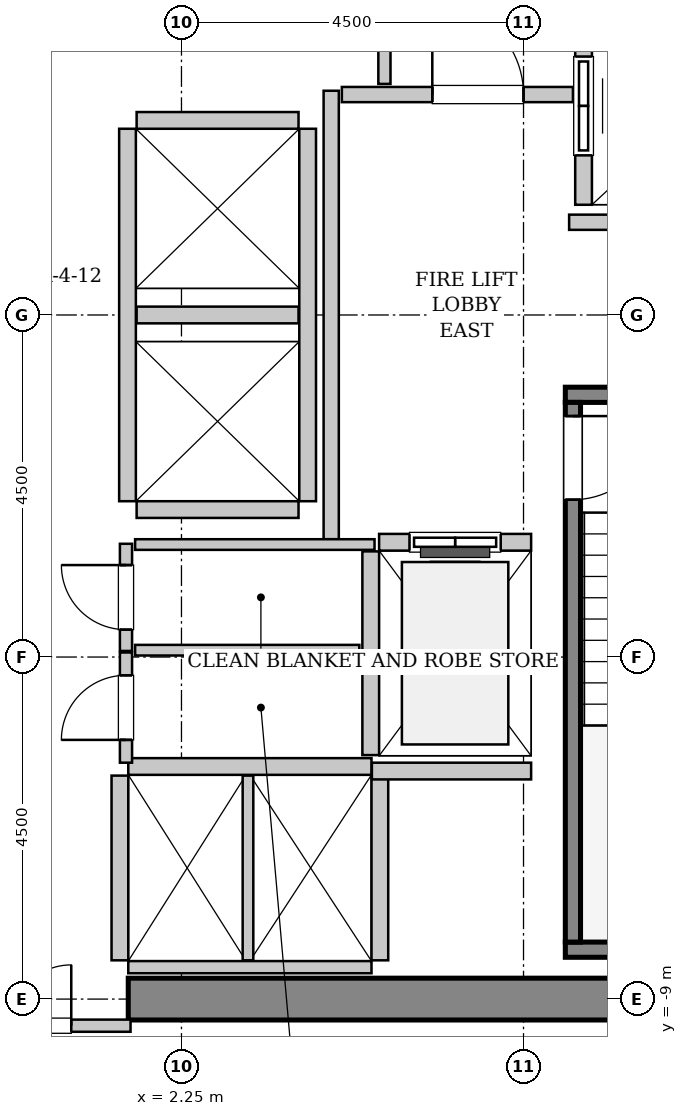
"""IFC4 building model, lengths in metres.
Left out: names, types, materials, properties, quantities, classifications, styles, units other than length and angle.
Written with IfcOpenShell. Run it as: python <this file> out.ifc"""

import sys

from ifc_helpers import new_model, si_unit, direction, frame, frame_2d, origin, place, context, subcontext, project, spatial, rectangle, extrude, source, transform, mapped, element, fill, save


model = new_model("IFC4")
c1 = context("Model", 3, precision=1e-05, world=origin(), true_north=direction((0.0, 1.0)))
c2 = subcontext(c1, "Body", "Model", "MODEL_VIEW")
j1 = project(units=[si_unit("LENGTHUNIT", "METRE"), si_unit("PLANEANGLEUNIT", "RADIAN")], contexts=[c1])
p1 = place(None, origin())
s1 = spatial("IfcSite", under=j1, at=p1, CompositionType="ELEMENT")
p2 = place(p1, origin())
s2 = spatial("IfcBuilding", under=s1, at=p2, CompositionType="ELEMENT")
p3 = place(p2, frame((0.0, 0.0, 109.8)))
s3 = spatial("IfcBuildingStorey", under=s2, at=p3, CompositionType="ELEMENT", Elevation=109.8)
m1 = source(origin(), c2, "Body", "SweptSolid", [
    extrude(rectangle(XDim=9.975, YDim=0.55, at=frame_2d((4.987, 0.0))), origin(), (0.0, 0.0, 1.0), 3.8),
])
p4 = place(p3, frame((1.55, -9.0, 0.0), z_axis=(0.0, 0.0, 1.0), x_axis=(1.0, 0.0, 0.0)))
e1 = element("IfcWall", 1, at=p4, inside=s3, PredefinedType="SHEAR", context=c2, shape_type="MappedRepresentation", body=[
    mapped(m1, transform((0.0, 0.0, 0.0), x_axis=(1.0, 0.0, 0.0), y_axis=(0.0, 1.0, 0.0), z_axis=(0.0, 0.0, 1.0), scale=1.0)),
])
m2 = source(origin(), c2, "Body", "SweptSolid", [
    extrude(rectangle(XDim=3.4, YDim=0.2, at=frame_2d((1.7, 0.0))), origin(), (0.0, 0.0, 1.0), 3.8),
])
p5 = place(p3, frame((7.3, -1.05, 0.0), z_axis=(0.0, 0.0, 1.0), x_axis=(1.0, 0.0, 0.0)))
e2 = element("IfcWall", 2, at=p5, inside=s3, PredefinedType="SOLIDWALL", context=c2, shape_type="MappedRepresentation", body=[
    mapped(m2, transform((0.0, 0.0, 0.0), x_axis=(1.0, 0.0, 0.0), y_axis=(0.0, 1.0, 0.0), z_axis=(0.0, 0.0, 1.0), scale=1.0)),
])
m3 = source(origin(), c2, "Body", "SweptSolid", [
    extrude(rectangle(XDim=3.68, YDim=0.2, at=frame_2d((1.84, 0.0))), origin(), (0.0, 0.0, 1.0), 3.8),
])
p6 = place(p3, frame((7.3, -8.35, 0.0), z_axis=(0.0, 0.0, 1.0), x_axis=(1.0, 0.0, 0.0)))
e3 = element("IfcWall", 3, at=p6, inside=s3, PredefinedType="SOLIDWALL", context=c2, shape_type="MappedRepresentation", body=[
    mapped(m3, transform((0.0, 0.0, 0.0), x_axis=(1.0, 0.0, 0.0), y_axis=(0.0, 1.0, 0.0), z_axis=(0.0, 0.0, 1.0), scale=1.0)),
])
m4 = source(origin(), c2, "Body", "SweptSolid", [
    extrude(rectangle(XDim=7.1, YDim=0.2, at=frame_2d((3.55, 0.0))), origin(), (0.0, 0.0, 1.0), 3.8),
])
p7 = place(p3, frame((7.4, -1.15, 0.0), z_axis=(0.0, 0.0, 1.0), x_axis=(0.0, -1.0, 0.0)))
e4 = element("IfcWall", 4, at=p7, inside=s3, PredefinedType="SOLIDWALL", context=c2, shape_type="MappedRepresentation", body=[
    mapped(m4, transform((0.0, 0.0, 0.0), x_axis=(1.0, 0.0, 0.0), y_axis=(0.0, 1.0, 0.0), z_axis=(0.0, 0.0, 1.0), scale=1.0)),
])
p8 = place(p7, frame((0.18, 0.0, 0.0)))
e5 = element("IfcOpeningElement", 5, at=p8, cuts=e4, PredefinedType="OPENING", context=c2, shape_type="SweptSolid", body=[
    extrude(rectangle(XDim=1.1, YDim=2.15, at=frame_2d((0.55, 1.075))), frame((0.0, 0.11, 0.0), z_axis=(0.0, -1.0, 0.0), x_axis=(1.0, 0.0, 0.0)), (0.0, 0.0, 1.0), 0.22),
])
m5 = source(origin(), c2, "Body", "SweptSolid", [
    extrude(rectangle(XDim=2.0, YDim=0.22, at=frame_2d((1.0, 0.0))), origin(), (0.0, 0.0, 1.0), 3.535),
])
p9 = place(p3, frame((6.85, -2.99, 0.0), z_axis=(0.0, 0.0, 1.0), x_axis=(-1.0, 0.0, 0.0)))
e6 = element("IfcWall", 6, at=p9, inside=s3, PredefinedType="SOLIDWALL", context=c2, shape_type="MappedRepresentation", body=[
    mapped(m5, transform((0.0, 0.0, 0.0), x_axis=(1.0, 0.0, 0.0), y_axis=(0.0, 1.0, 0.0), z_axis=(0.0, 0.0, 1.0), scale=1.0)),
])
p10 = place(p9, frame((0.4, 0.0, 0.0)))
e7 = element("IfcOpeningElement", 7, at=p10, cuts=e6, PredefinedType="OPENING", context=c2, shape_type="SweptSolid", body=[
    extrude(rectangle(XDim=1.2, YDim=2.2, at=frame_2d((0.6, 1.1))), frame((0.0, 0.12, 0.0), z_axis=(0.0, -1.0, 0.0), x_axis=(1.0, 0.0, 0.0)), (0.0, 0.0, 1.0), 0.24),
])
m6 = source(origin(), c2, "Body", "SweptSolid", [
    extrude(rectangle(XDim=2.68, YDim=0.22, at=frame_2d((1.34, 0.0))), origin(), (0.0, 0.0, 1.0), 3.535),
])
p11 = place(p3, frame((4.74, -3.11, 0.0), z_axis=(0.0, 0.0, 1.0), x_axis=(0.0, -1.0, 0.0)))
e8 = element("IfcWall", 8, at=p11, inside=s3, PredefinedType="SOLIDWALL", context=c2, shape_type="MappedRepresentation", body=[
    mapped(m6, transform((0.0, 0.0, 0.0), x_axis=(1.0, 0.0, 0.0), y_axis=(0.0, 1.0, 0.0), z_axis=(0.0, 0.0, 1.0), scale=1.0)),
])
m7 = source(origin(), c2, "Body", "SweptSolid", [
    extrude(rectangle(XDim=5.45, YDim=0.22, at=frame_2d((2.725, 0.0))), origin(), (0.0, 0.0, 1.0), 3.535),
])
p12 = place(p3, frame((7.54, 6.9, 0.0), z_axis=(0.0, 0.0, 1.0), x_axis=(0.0, -1.0, 0.0)))
e9 = element("IfcWall", 9, at=p12, inside=s3, PredefinedType="SOLIDWALL", context=c2, shape_type="MappedRepresentation", body=[
    mapped(m7, transform((0.0, 0.0, 0.0), x_axis=(1.0, 0.0, 0.0), y_axis=(0.0, 1.0, 0.0), z_axis=(0.0, 0.0, 1.0), scale=1.0)),
])
p13 = place(p12, frame((3.5, 0.0, 0.0)))
e10 = element("IfcOpeningElement", 10, at=p13, cuts=e9, PredefinedType="OPENING", context=c2, shape_type="SweptSolid", body=[
    extrude(rectangle(XDim=1.3, YDim=2.3, at=frame_2d((0.65, 1.15))), frame((0.0, 0.12, 0.0), z_axis=(0.0, -1.0, 0.0), x_axis=(1.0, 0.0, 0.0)), (0.0, 0.0, 1.0), 0.24),
])
p14 = place(p12, frame((0.65, 0.0, 0.0)))
e11 = element("IfcOpeningElement", 11, at=p14, cuts=e9, PredefinedType="OPENING", context=c2, shape_type="SweptSolid", body=[
    extrude(rectangle(XDim=1.3, YDim=2.3, at=frame_2d((0.65, 1.15))), frame((0.0, 0.12, 0.0), z_axis=(0.0, -1.0, 0.0), x_axis=(1.0, 0.0, 0.0)), (0.0, 0.0, 1.0), 0.24),
])
m8 = source(origin(), c2, "Body", "SweptSolid", [
    extrude(rectangle(XDim=3.2, YDim=0.22, at=frame_2d((1.6, 0.0))), origin(), (0.0, 0.0, 1.0), 3.535),
])
p15 = place(p3, frame((4.75, -5.94, 0.0), z_axis=(0.0, 0.0, 1.0), x_axis=(-1.0, 0.0, 0.0)))
e12 = element("IfcWall", 12, at=p15, inside=s3, PredefinedType="SOLIDWALL", context=c2, shape_type="MappedRepresentation", body=[
    mapped(m8, transform((0.0, 0.0, 0.0), x_axis=(1.0, 0.0, 0.0), y_axis=(0.0, 1.0, 0.0), z_axis=(0.0, 0.0, 1.0), scale=1.0)),
])
m9 = source(origin(), c2, "Body", "SweptSolid", [
    extrude(rectangle(XDim=3.2, YDim=0.16, at=frame_2d((1.6, 0.0))), origin(), (0.0, 0.0, 1.0), 2.425),
])
p16 = place(p3, frame((1.55, -8.58, 0.0), z_axis=(0.0, 0.0, 1.0), x_axis=(1.0, 0.0, 0.0)))
e13 = element("IfcWall", 13, at=p16, inside=s3, PredefinedType="PARTITIONING", context=c2, shape_type="MappedRepresentation", body=[
    mapped(m9, transform((0.0, 0.0, 0.0), x_axis=(1.0, 0.0, 0.0), y_axis=(0.0, 1.0, 0.0), z_axis=(0.0, 0.0, 1.0), scale=1.0)),
])
m10 = source(origin(), c2, "Body", "SweptSolid", [
    extrude(rectangle(XDim=2.43, YDim=0.22, at=frame_2d((1.215, 0.0))), origin(), (0.0, 0.0, 1.0), 3.535),
])
p17 = place(p3, frame((1.44, -6.06, 0.0), z_axis=(0.0, 0.0, 1.0), x_axis=(0.0, -1.0, 0.0)))
e14 = element("IfcWall", 14, at=p17, inside=s3, PredefinedType="SOLIDWALL", context=c2, shape_type="MappedRepresentation", body=[
    mapped(m10, transform((0.0, 0.0, 0.0), x_axis=(1.0, 0.0, 0.0), y_axis=(0.0, 1.0, 0.0), z_axis=(0.0, 0.0, 1.0), scale=1.0)),
])
m11 = source(origin(), c2, "Body", "SweptSolid", [
    extrude(rectangle(XDim=2.43, YDim=0.14, at=frame_2d((1.215, 0.0))), origin(), (0.0, 0.0, 1.0), 3.535),
])
p18 = place(p3, frame((3.125, -8.49, 0.0), z_axis=(0.0, 0.0, 1.0), x_axis=(0.0, 1.0, 0.0)))
e15 = element("IfcWall", 15, at=p18, inside=s3, PredefinedType="PARTITIONING", context=c2, shape_type="MappedRepresentation", body=[
    mapped(m11, transform((0.0, 0.0, 0.0), x_axis=(1.0, 0.0, 0.0), y_axis=(0.0, 1.0, 0.0), z_axis=(0.0, 0.0, 1.0), scale=1.0)),
])
p19 = place(p3, frame((4.86, -8.49, 0.0), z_axis=(0.0, 0.0, 1.0), x_axis=(0.0, 1.0, 0.0)))
e16 = element("IfcWall", 16, at=p19, inside=s3, PredefinedType="SOLIDWALL", context=c2, shape_type="MappedRepresentation", body=[
    mapped(m10, transform((0.0, 0.0, 0.0), x_axis=(1.0, 0.0, 0.0), y_axis=(0.0, 1.0, 0.0), z_axis=(0.0, 0.0, 1.0), scale=1.0)),
])
m12 = source(origin(), c2, "Body", "SweptSolid", [
    extrude(rectangle(XDim=4.9, YDim=0.22, at=frame_2d((2.45, 0.0))), origin(), (0.0, 0.0, 1.0), 3.535),
])
for number, where, z_axis, x_axis in (
    (17, (1.54, 2.45, 0.0), (0.0, 0.0, 1.0), (0.0, -1.0, 0.0)),
    (18, (3.91, -2.45, 0.0), (0.0, 0.0, 1.0), (0.0, 1.0, 0.0)),
):
    element("IfcWall", number, at=place(p3, frame(where, z_axis=z_axis, x_axis=x_axis)), inside=s3, PredefinedType="SOLIDWALL", context=c2, shape_type="MappedRepresentation", body=[
        mapped(m12, transform((0.0, 0.0, 0.0), x_axis=(1.0, 0.0, 0.0), y_axis=(0.0, 1.0, 0.0), z_axis=(0.0, 0.0, 1.0), scale=1.0)),
    ])
m13 = source(origin(), c2, "Body", "SweptSolid", [
    extrude(rectangle(XDim=2.13, YDim=0.22, at=frame_2d((1.065, 0.0))), origin(), (0.0, 0.0, 1.0), 3.535),
])
for number, where, z_axis, x_axis in (
    (19, (1.66, -2.56, 0.0), (0.0, 0.0, 1.0), (1.0, 0.0, 0.0)),
    (20, (1.66, 0.0, 0.0), (0.0, 0.0, 1.0), (1.0, 0.0, 0.0)),
    (21, (3.79, 2.56, 0.0), (0.0, 0.0, 1.0), (-1.0, 0.0, 0.0)),
):
    element("IfcWall", number, at=place(p3, frame(where, z_axis=z_axis, x_axis=x_axis)), inside=s3, PredefinedType="SOLIDWALL", context=c2, shape_type="MappedRepresentation", body=[
        mapped(m13, transform((0.0, 0.0, 0.0), x_axis=(1.0, 0.0, 0.0), y_axis=(0.0, 1.0, 0.0), z_axis=(0.0, 0.0, 1.0), scale=1.0)),
    ])
m14 = source(origin(), c2, "Body", "SweptSolid", [
    extrude(rectangle(XDim=2.095, YDim=0.22, at=frame_2d((1.048, 0.0))), origin(), (0.0, 0.0, 1.0), 3.535),
])
p20 = place(p3, frame((4.755, -6.0, 0.0), z_axis=(0.0, 0.0, 1.0), x_axis=(1.0, 0.0, 0.0)))
e22 = element("IfcWall", 22, at=p20, inside=s3, PredefinedType="SOLIDWALL", context=c2, shape_type="MappedRepresentation", body=[
    mapped(m14, transform((0.0, 0.0, 0.0), x_axis=(1.0, 0.0, 0.0), y_axis=(0.0, 1.0, 0.0), z_axis=(0.0, 0.0, 1.0), scale=1.0)),
])
m15 = source(origin(), c2, "Body", "SweptSolid", [
    extrude(rectangle(XDim=5.9, YDim=0.2, at=frame_2d((2.95, 0.0))), origin(), (0.0, 0.0, 1.0), 3.535),
])
p21 = place(p3, frame((4.22, -2.95, 0.0), z_axis=(0.0, 0.0, 1.0), x_axis=(0.0, 1.0, 0.0)))
e23 = element("IfcWall", 23, at=p21, inside=s3, PredefinedType="PARTITIONING", context=c2, shape_type="MappedRepresentation", body=[
    mapped(m15, transform((0.0, 0.0, 0.0), x_axis=(1.0, 0.0, 0.0), y_axis=(0.0, 1.0, 0.0), z_axis=(0.0, 0.0, 1.0), scale=1.0)),
])
m16 = source(origin(), c2, "Body", "SweptSolid", [
    extrude(rectangle(XDim=3.04, YDim=0.2, at=frame_2d((1.52, 0.0))), origin(), (0.0, 0.0, 1.0), 3.535),
])
p22 = place(p3, frame((4.36, 2.9, 0.0), z_axis=(0.0, 0.0, 1.0), x_axis=(1.0, 0.0, 0.0)))
e24 = element("IfcWall", 24, at=p22, inside=s3, PredefinedType="PARTITIONING", context=c2, shape_type="MappedRepresentation", body=[
    mapped(m16, transform((0.0, 0.0, 0.0), x_axis=(1.0, 0.0, 0.0), y_axis=(0.0, 1.0, 0.0), z_axis=(0.0, 0.0, 1.0), scale=1.0)),
])
p23 = place(p22, frame((1.19, 0.0, 0.0)))
e25 = element("IfcOpeningElement", 25, at=p23, cuts=e24, PredefinedType="OPENING", context=c2, shape_type="SweptSolid", body=[
    extrude(rectangle(XDim=1.2, YDim=2.15, at=frame_2d((0.6, 1.075))), frame((0.0, 0.11, 0.0), z_axis=(0.0, -1.0, 0.0), x_axis=(1.0, 0.0, 0.0)), (0.0, 0.0, 1.0), 0.22),
])
m17 = source(origin(), c2, "Body", "SweptSolid", [
    extrude(rectangle(XDim=4.11, YDim=0.2, at=frame_2d((2.055, 0.0))), origin(), (0.0, 0.0, 1.0), 3.535),
])
p24 = place(p3, frame((7.35, 1.22, 0.0), z_axis=(0.0, 0.0, 1.0), x_axis=(1.0, 0.0, 0.0)))
e26 = element("IfcWall", 26, at=p24, inside=s3, PredefinedType="PARTITIONING", context=c2, shape_type="MappedRepresentation", body=[
    mapped(m17, transform((0.0, 0.0, 0.0), x_axis=(1.0, 0.0, 0.0), y_axis=(0.0, 1.0, 0.0), z_axis=(0.0, 0.0, 1.0), scale=1.0)),
])
m18 = source(origin(), c2, "Body", "SweptSolid", [
    extrude(rectangle(XDim=3.16, YDim=0.16, at=frame_2d((1.58, 0.0))), origin(), (0.0, 0.0, 1.0), 2.425),
])
p25 = place(p3, frame((-1.58, -9.35, 0.0), z_axis=(0.0, 0.0, 1.0), x_axis=(1.0, 0.0, 0.0)))
e27 = element("IfcWall", 27, at=p25, inside=s3, PredefinedType="PARTITIONING", context=c2, shape_type="MappedRepresentation", body=[
    mapped(m18, transform((0.0, 0.0, 0.0), x_axis=(1.0, 0.0, 0.0), y_axis=(0.0, 1.0, 0.0), z_axis=(0.0, 0.0, 1.0), scale=1.0)),
])
p26 = place(p25, frame((0.78, 0.0, 0.0)))
e28 = element("IfcOpeningElement", 28, at=p26, cuts=e27, PredefinedType="OPENING", context=c2, shape_type="SweptSolid", body=[
    extrude(rectangle(XDim=1.6, YDim=2.3, at=frame_2d((0.8, 1.15))), frame((0.0, 0.09, 0.0), z_axis=(0.0, -1.0, 0.0), x_axis=(1.0, 0.0, 0.0)), (0.0, 0.0, 1.0), 0.18),
])
m19 = source(origin(), c2, "Body", "SweptSolid", [
    extrude(rectangle(XDim=3.015, YDim=0.16, at=frame_2d((1.507, 0.0))), origin(), (0.0, 0.0, 1.0), 3.535),
])
p27 = place(p3, frame((4.92, 3.04, 0.0), z_axis=(0.0, 0.0, 1.0), x_axis=(0.0, 1.0, 0.0)))
e29 = element("IfcWall", 29, at=p27, inside=s3, PredefinedType="PARTITIONING", context=c2, shape_type="MappedRepresentation", body=[
    mapped(m19, transform((0.0, 0.0, 0.0), x_axis=(1.0, 0.0, 0.0), y_axis=(0.0, 1.0, 0.0), z_axis=(0.0, 0.0, 1.0), scale=1.0)),
])
m20 = source(origin(), c2, "Body", "SweptSolid", [
    extrude(rectangle(XDim=1.41, YDim=0.16, at=frame_2d((0.705, 0.0))), origin(), (0.0, 0.0, 1.0), 3.535),
])
p28 = place(p3, frame((1.52, -4.42, 0.0), z_axis=(0.0, 0.0, 1.0), x_axis=(0.0, 1.0, 0.0)))
e30 = element("IfcWall", 30, at=p28, inside=s3, PredefinedType="PARTITIONING", context=c2, shape_type="MappedRepresentation", body=[
    mapped(m20, transform((0.0, 0.0, 0.0), x_axis=(1.0, 0.0, 0.0), y_axis=(0.0, 1.0, 0.0), z_axis=(0.0, 0.0, 1.0), scale=1.0)),
])
p29 = place(p28, frame((0.28, 0.0, 0.0)))
e31 = element("IfcOpeningElement", 31, at=p29, cuts=e30, PredefinedType="OPENING", context=c2, shape_type="SweptSolid", body=[
    extrude(rectangle(XDim=0.85, YDim=2.1, at=frame_2d((0.425, 1.05))), frame((0.0, 0.09, 0.0), z_axis=(0.0, -1.0, 0.0), x_axis=(1.0, 0.0, 0.0)), (0.0, 0.0, 1.0), 0.18),
])
m21 = source(origin(), c2, "Body", "SweptSolid", [
    extrude(rectangle(XDim=3.15, YDim=0.14, at=frame_2d((1.575, 0.0))), origin(), (0.0, 0.0, 1.0), 3.535),
])
p30 = place(p3, frame((1.64, -3.02, 0.0), z_axis=(0.0, 0.0, 1.0), x_axis=(1.0, 0.0, 0.0)))
e32 = element("IfcWall", 32, at=p30, inside=s3, PredefinedType="PARTITIONING", context=c2, shape_type="MappedRepresentation", body=[
    mapped(m21, transform((0.0, 0.0, 0.0), x_axis=(1.0, 0.0, 0.0), y_axis=(0.0, 1.0, 0.0), z_axis=(0.0, 0.0, 1.0), scale=1.0)),
])
m22 = source(origin(), c2, "Body", "SweptSolid", [
    extrude(rectangle(XDim=2.95, YDim=0.14, at=frame_2d((1.475, 0.0))), origin(), (0.0, 0.0, 1.0), 3.535),
])
p31 = place(p3, frame((1.64, -4.41, 0.0), z_axis=(0.0, 0.0, 1.0), x_axis=(1.0, 0.0, 0.0)))
e33 = element("IfcWall", 33, at=p31, inside=s3, PredefinedType="PARTITIONING", context=c2, shape_type="MappedRepresentation", body=[
    mapped(m22, transform((0.0, 0.0, 0.0), x_axis=(1.0, 0.0, 0.0), y_axis=(0.0, 1.0, 0.0), z_axis=(0.0, 0.0, 1.0), scale=1.0)),
])
m23 = source(origin(), c2, "Body", "SweptSolid", [
    extrude(rectangle(XDim=1.45, YDim=0.16, at=frame_2d((0.725, 0.0))), origin(), (0.0, 0.0, 1.0), 3.535),
])
p32 = place(p3, frame((1.52, -5.89, 0.0), z_axis=(0.0, 0.0, 1.0), x_axis=(0.0, 1.0, 0.0)))
e34 = element("IfcWall", 34, at=p32, inside=s3, PredefinedType="PARTITIONING", context=c2, shape_type="MappedRepresentation", body=[
    mapped(m23, transform((0.0, 0.0, 0.0), x_axis=(1.0, 0.0, 0.0), y_axis=(0.0, 1.0, 0.0), z_axis=(0.0, 0.0, 1.0), scale=1.0)),
])
p33 = place(p32, frame((0.3, 0.0, 0.0)))
e35 = element("IfcOpeningElement", 35, at=p33, cuts=e34, PredefinedType="OPENING", context=c2, shape_type="SweptSolid", body=[
    extrude(rectangle(XDim=0.85, YDim=2.1, at=frame_2d((0.425, 1.05))), frame((0.0, 0.09, 0.0), z_axis=(0.0, -1.0, 0.0), x_axis=(1.0, 0.0, 0.0)), (0.0, 0.0, 1.0), 0.18),
])
m24 = source(origin(), c2, "Body", "SweptSolid", [
    extrude(rectangle(XDim=1.1, YDim=2.15, at=frame_2d((0.55, 1.075))), frame((0.0, 0.025, 0.0), z_axis=(0.0, -1.0, 0.0), x_axis=(1.0, 0.0, 0.0)), (0.0, 0.0, 1.0), 0.05),
])
p34 = place(p8, origin())
e36 = element("IfcDoor", 36, at=p34, inside=s3, OperationType="SINGLE_SWING_LEFT", PredefinedType="DOOR", context=c2, shape_type="MappedRepresentation", body=[
    mapped(m24, transform((0.0, 0.0, 0.0), x_axis=(1.0, 0.0, 0.0), y_axis=(0.0, 1.0, 0.0), z_axis=(0.0, 0.0, 1.0), scale=1.0)),
])
fill(e5, e36)
m25 = source(origin(), c2, "Body", "SweptSolid", [
    extrude(rectangle(XDim=1.2, YDim=2.2, at=frame_2d((0.6, 1.1))), frame((0.0, 0.025, 0.0), z_axis=(0.0, -1.0, 0.0), x_axis=(1.0, 0.0, 0.0)), (0.0, 0.0, 1.0), 0.05),
])
p35 = place(p10, origin())
e37 = element("IfcDoor", 37, at=p35, inside=s3, OperationType="SLIDING_TO_LEFT", PredefinedType="DOOR", context=c2, shape_type="MappedRepresentation", body=[
    mapped(m25, transform((0.0, 0.0, 0.0), x_axis=(1.0, 0.0, 0.0), y_axis=(0.0, 1.0, 0.0), z_axis=(0.0, 0.0, 1.0), scale=1.0)),
])
fill(e7, e37)
m26 = source(origin(), c2, "Body", "SweptSolid", [
    extrude(rectangle(XDim=1.3, YDim=2.3, at=frame_2d((0.65, 1.15))), frame((0.0, 0.025, 0.0), z_axis=(0.0, -1.0, 0.0), x_axis=(1.0, 0.0, 0.0)), (0.0, 0.0, 1.0), 0.05),
])
p36 = place(p13, origin())
e38 = element("IfcDoor", 38, at=p36, inside=s3, OperationType="SLIDING_TO_RIGHT", PredefinedType="DOOR", context=c2, shape_type="MappedRepresentation", body=[
    mapped(m26, transform((0.0, 0.0, 0.0), x_axis=(1.0, 0.0, 0.0), y_axis=(0.0, 1.0, 0.0), z_axis=(0.0, 0.0, 1.0), scale=1.0)),
])
fill(e10, e38)
m27 = source(origin(), c2, "Body", "SweptSolid", [
    extrude(rectangle(XDim=1.2, YDim=2.15, at=frame_2d((0.6, 1.075))), frame((0.0, 0.025, 0.0), z_axis=(0.0, -1.0, 0.0), x_axis=(1.0, 0.0, 0.0)), (0.0, 0.0, 1.0), 0.05),
])
p37 = place(p23, origin())
e39 = element("IfcDoor", 39, at=p37, inside=s3, OperationType="SINGLE_SWING_LEFT", PredefinedType="DOOR", context=c2, shape_type="MappedRepresentation", body=[
    mapped(m27, transform((0.0, 0.0, 0.0), x_axis=(1.0, 0.0, 0.0), y_axis=(0.0, 1.0, 0.0), z_axis=(0.0, 0.0, 1.0), scale=1.0)),
])
fill(e25, e39)
m28 = source(origin(), c2, "Body", "SweptSolid", [
    extrude(rectangle(XDim=1.6, YDim=2.3, at=frame_2d((0.8, 1.15))), frame((0.0, 0.025, 0.0), z_axis=(0.0, -1.0, 0.0), x_axis=(1.0, 0.0, 0.0)), (0.0, 0.0, 1.0), 0.05),
])
p38 = place(p26, origin())
e40 = element("IfcDoor", 40, at=p38, inside=s3, OperationType="DOUBLE_DOOR_SINGLE_SWING", PredefinedType="DOOR", context=c2, shape_type="MappedRepresentation", body=[
    mapped(m28, transform((0.0, 0.0, 0.0), x_axis=(1.0, 0.0, 0.0), y_axis=(0.0, 1.0, 0.0), z_axis=(0.0, 0.0, 1.0), scale=1.0)),
])
fill(e28, e40)
m29 = source(origin(), c2, "Body", "SweptSolid", [
    extrude(rectangle(XDim=0.85, YDim=2.1, at=frame_2d((0.425, 1.05))), frame((0.0, 0.025, 0.0), z_axis=(0.0, -1.0, 0.0), x_axis=(1.0, 0.0, 0.0)), (0.0, 0.0, 1.0), 0.05),
])
p39 = place(p29, origin())
e41 = element("IfcDoor", 41, at=p39, inside=s3, OperationType="SINGLE_SWING_RIGHT", PredefinedType="DOOR", context=c2, shape_type="MappedRepresentation", body=[
    mapped(m29, transform((0.0, 0.0, 0.0), x_axis=(1.0, 0.0, 0.0), y_axis=(0.0, 1.0, 0.0), z_axis=(0.0, 0.0, 1.0), scale=1.0)),
])
fill(e31, e41)
p40 = place(p33, origin())
e42 = element("IfcDoor", 42, at=p40, inside=s3, OperationType="SINGLE_SWING_LEFT", PredefinedType="DOOR", context=c2, shape_type="MappedRepresentation", body=[
    mapped(m29, transform((0.0, 0.0, 0.0), x_axis=(1.0, 0.0, 0.0), y_axis=(0.0, 1.0, 0.0), z_axis=(0.0, 0.0, 1.0), scale=1.0)),
])
fill(e35, e42)
save(model, sys.argv[1])
